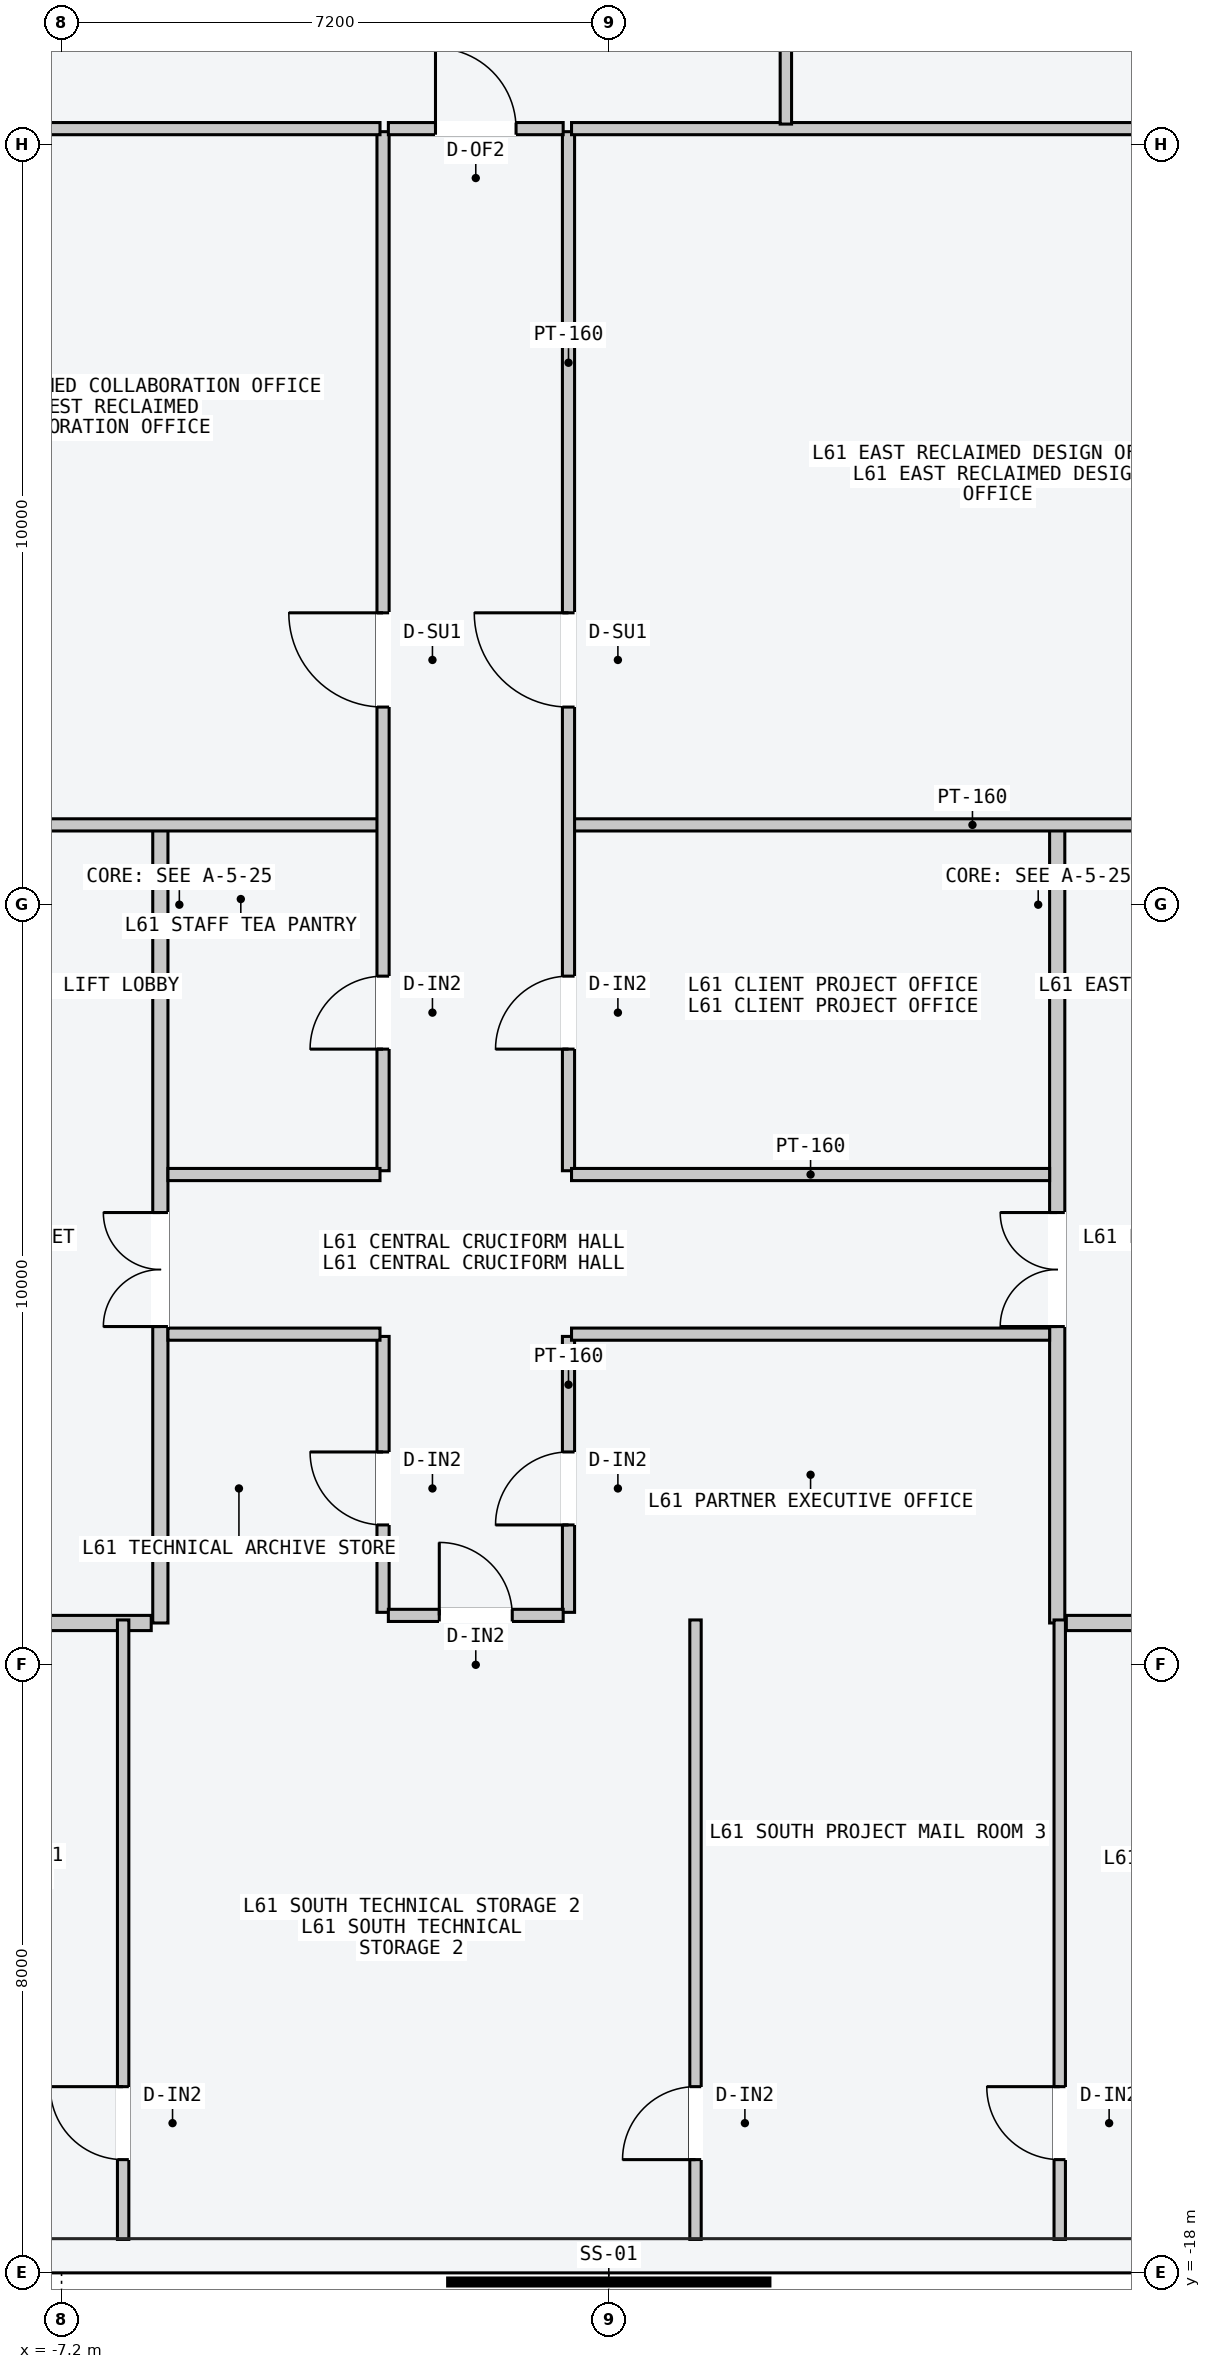
"""IFC4 building model, lengths in metres.
Left out: names, types, materials, properties, quantities, classifications, styles, units other than length and angle.
Written with IfcOpenShell. Run it as: python <this file> out.ifc"""

import sys

from ifc_helpers import new_model, si_unit, direction, frame, frame_2d, origin, place, context, subcontext, project, spatial, rectangle, extrude, element, fill, save


model = new_model("IFC4")
c1 = context("Model", 3, precision=1e-05, world=origin(), true_north=direction((0.0, 1.0)))
c2 = subcontext(c1, "Body", "Model", "MODEL_VIEW")
j1 = project(units=[si_unit("LENGTHUNIT", "METRE"), si_unit("PLANEANGLEUNIT", "RADIAN")], contexts=[c1])
p1 = place(None, origin())
s1 = spatial("IfcSite", under=j1, at=p1, CompositionType="ELEMENT")
p2 = place(p1, origin())
s2 = spatial("IfcBuilding", under=s1, at=p2, CompositionType="ELEMENT")
p3 = place(p2, frame((0.0, 0.0, 232.8)))
s3 = spatial("IfcBuildingStorey", under=s2, at=p3, CompositionType="ELEMENT", Elevation=232.8)
p4 = place(p3, frame((-5.9, -9.45, 0.0), z_axis=(0.0, 0.0, 1.0), x_axis=(0.0, 1.0, 0.0)))
e1 = element("IfcWall", 1, at=p4, inside=s3, PredefinedType="PARTITIONING", context=c2, shape_type="SweptSolid", body=[
    extrude(rectangle(XDim=10.5, YDim=0.2, at=frame_2d((5.25, 0.0))), origin(), (0.0, 0.0, 1.0), 3.4),
])
p5 = place(p4, frame((3.9, 0.0, 0.0)))
e2 = element("IfcOpeningElement", 2, at=p5, cuts=e1, PredefinedType="OPENING", context=c2, shape_type="SweptSolid", body=[
    extrude(rectangle(XDim=1.5, YDim=2.2, at=frame_2d((0.75, 1.1))), frame((0.0, 0.11, 0.0), z_axis=(0.0, -1.0, 0.0), x_axis=(1.0, 0.0, 0.0)), (0.0, 0.0, 1.0), 0.22),
])
p6 = place(p3, frame((-6.02, -9.45, 0.0), z_axis=(0.0, 0.0, 1.0), x_axis=(-1.0, 0.0, 0.0)))
e3 = element("IfcWall", 3, at=p6, inside=s3, PredefinedType="PARTITIONING", context=c2, shape_type="SweptSolid", body=[
    extrude(rectangle(XDim=1.8, YDim=0.2, at=frame_2d((0.9, 0.0))), origin(), (0.0, 0.0, 1.0), 3.4),
])
p7 = place(p3, frame((5.9, -9.45, 0.0), z_axis=(0.0, 0.0, 1.0), x_axis=(0.0, 1.0, 0.0)))
e4 = element("IfcWall", 4, at=p7, inside=s3, PredefinedType="PARTITIONING", context=c2, shape_type="SweptSolid", body=[
    extrude(rectangle(XDim=10.5, YDim=0.2, at=frame_2d((5.25, 0.0))), origin(), (0.0, 0.0, 1.0), 3.4),
])
p8 = place(p7, frame((3.9, 0.0, 0.0)))
e5 = element("IfcOpeningElement", 5, at=p8, cuts=e4, PredefinedType="OPENING", context=c2, shape_type="SweptSolid", body=[
    extrude(rectangle(XDim=1.5, YDim=2.2, at=frame_2d((0.75, 1.1))), frame((0.0, 0.11, 0.0), z_axis=(0.0, -1.0, 0.0), x_axis=(1.0, 0.0, 0.0)), (0.0, 0.0, 1.0), 0.22),
])
p9 = place(p3, frame((6.02, -9.45, 0.0), z_axis=(0.0, 0.0, 1.0), x_axis=(1.0, 0.0, 0.0)))
e6 = element("IfcWall", 6, at=p9, inside=s3, PredefinedType="PARTITIONING", context=c2, shape_type="SweptSolid", body=[
    extrude(rectangle(XDim=1.8, YDim=0.2, at=frame_2d((0.9, 0.0))), origin(), (0.0, 0.0, 1.0), 3.4),
])
p10 = place(p3, frame((-10.05, 1.05, 0.0), z_axis=(0.0, 0.0, 1.0), x_axis=(1.0, 0.0, 0.0)))
e7 = element("IfcWall", 7, at=p10, inside=s3, PredefinedType="PARTITIONING", context=c2, shape_type="SweptSolid", body=[
    extrude(rectangle(XDim=7.04, YDim=0.16, at=frame_2d((3.52, 0.0))), origin(), (0.0, 0.0, 1.0), 3.4),
])
p11 = place(p3, frame((-2.97, -3.5, 0.0), z_axis=(0.0, 0.0, 1.0), x_axis=(0.0, 1.0, 0.0)))
e8 = element("IfcWall", 8, at=p11, inside=s3, PredefinedType="PARTITIONING", context=c2, shape_type="SweptSolid", body=[
    extrude(rectangle(XDim=13.67, YDim=0.16, at=frame_2d((6.835, 0.0))), origin(), (0.0, 0.0, 1.0), 3.4),
])
p12 = place(p11, frame((6.1, 0.0, 0.0)))
e9 = element("IfcOpeningElement", 9, at=p12, cuts=e8, PredefinedType="OPENING", context=c2, shape_type="SweptSolid", body=[
    extrude(rectangle(XDim=1.24, YDim=2.24, at=frame_2d((0.62, 1.12))), frame((0.0, 0.09, 0.0), z_axis=(0.0, -1.0, 0.0), x_axis=(1.0, 0.0, 0.0)), (0.0, 0.0, 1.0), 0.18),
])
p13 = place(p11, frame((1.6, 0.0, 0.0)))
e10 = element("IfcOpeningElement", 10, at=p13, cuts=e8, PredefinedType="OPENING", context=c2, shape_type="SweptSolid", body=[
    extrude(rectangle(XDim=0.96, YDim=2.18, at=frame_2d((0.48, 1.09))), frame((0.0, 0.09, 0.0), z_axis=(0.0, -1.0, 0.0), x_axis=(1.0, 0.0, 0.0)), (0.0, 0.0, 1.0), 0.18),
])
p14 = place(p3, frame((-7.5, 10.21, 0.0), z_axis=(0.0, 0.0, 1.0), x_axis=(1.0, 0.0, 0.0)))
e11 = element("IfcWall", 11, at=p14, inside=s3, PredefinedType="PARTITIONING", context=c2, shape_type="SweptSolid", body=[
    extrude(rectangle(XDim=4.49, YDim=0.16, at=frame_2d((2.245, 0.0))), origin(), (0.0, 0.0, 1.0), 3.4),
])
p15 = place(p3, frame((-5.8, -3.55, 0.0), z_axis=(0.0, 0.0, 1.0), x_axis=(1.0, 0.0, 0.0)))
e12 = element("IfcWall", 12, at=p15, inside=s3, PredefinedType="PARTITIONING", context=c2, shape_type="SweptSolid", body=[
    extrude(rectangle(XDim=2.79, YDim=0.16, at=frame_2d((1.395, 0.0))), origin(), (0.0, 0.0, 1.0), 3.4),
])
p16 = place(p3, frame((-0.49, 1.05, 0.0), z_axis=(0.0, 0.0, 1.0), x_axis=(1.0, 0.0, 0.0)))
e13 = element("IfcWall", 13, at=p16, inside=s3, PredefinedType="PARTITIONING", context=c2, shape_type="SweptSolid", body=[
    extrude(rectangle(XDim=10.55, YDim=0.16, at=frame_2d((5.275, 0.0))), origin(), (0.0, 0.0, 1.0), 3.4),
])
p17 = place(p3, frame((-0.53, -3.5, 0.0), z_axis=(0.0, 0.0, 1.0), x_axis=(0.0, 1.0, 0.0)))
e14 = element("IfcWall", 14, at=p17, inside=s3, PredefinedType="PARTITIONING", context=c2, shape_type="SweptSolid", body=[
    extrude(rectangle(XDim=13.67, YDim=0.16, at=frame_2d((6.835, 0.0))), origin(), (0.0, 0.0, 1.0), 3.4),
])
p18 = place(p17, frame((6.1, 0.0, 0.0)))
e15 = element("IfcOpeningElement", 15, at=p18, cuts=e14, PredefinedType="OPENING", context=c2, shape_type="SweptSolid", body=[
    extrude(rectangle(XDim=1.24, YDim=2.24, at=frame_2d((0.62, 1.12))), frame((0.0, 0.09, 0.0), z_axis=(0.0, -1.0, 0.0), x_axis=(1.0, 0.0, 0.0)), (0.0, 0.0, 1.0), 0.18),
])
p19 = place(p17, frame((1.6, 0.0, 0.0)))
e16 = element("IfcOpeningElement", 16, at=p19, cuts=e14, PredefinedType="OPENING", context=c2, shape_type="SweptSolid", body=[
    extrude(rectangle(XDim=0.96, YDim=2.18, at=frame_2d((0.48, 1.09))), frame((0.0, 0.09, 0.0), z_axis=(0.0, -1.0, 0.0), x_axis=(1.0, 0.0, 0.0)), (0.0, 0.0, 1.0), 0.18),
])
p20 = place(p3, frame((-0.49, 10.21, 0.0), z_axis=(0.0, 0.0, 1.0), x_axis=(1.0, 0.0, 0.0)))
e17 = element("IfcWall", 17, at=p20, inside=s3, PredefinedType="PARTITIONING", context=c2, shape_type="SweptSolid", body=[
    extrude(rectangle(XDim=7.99, YDim=0.16, at=frame_2d((3.995, 0.0))), origin(), (0.0, 0.0, 1.0), 3.4),
])
p21 = place(p3, frame((-0.49, -3.55, 0.0), z_axis=(0.0, 0.0, 1.0), x_axis=(1.0, 0.0, 0.0)))
e18 = element("IfcWall", 18, at=p21, inside=s3, PredefinedType="PARTITIONING", context=c2, shape_type="SweptSolid", body=[
    extrude(rectangle(XDim=6.29, YDim=0.16, at=frame_2d((3.145, 0.0))), origin(), (0.0, 0.0, 1.0), 3.4),
])
p22 = place(p3, frame((-2.97, -9.31, 0.0), z_axis=(0.0, 0.0, 1.0), x_axis=(0.0, 1.0, 0.0)))
e19 = element("IfcWall", 19, at=p22, inside=s3, PredefinedType="PARTITIONING", context=c2, shape_type="SweptSolid", body=[
    extrude(rectangle(XDim=3.63, YDim=0.16, at=frame_2d((1.815, 0.0))), origin(), (0.0, 0.0, 1.0), 3.4),
])
p23 = place(p22, frame((1.15, 0.0, 0.0)))
e20 = element("IfcOpeningElement", 20, at=p23, cuts=e19, PredefinedType="OPENING", context=c2, shape_type="SweptSolid", body=[
    extrude(rectangle(XDim=0.96, YDim=2.18, at=frame_2d((0.48, 1.09))), frame((0.0, 0.09, 0.0), z_axis=(0.0, -1.0, 0.0), x_axis=(1.0, 0.0, 0.0)), (0.0, 0.0, 1.0), 0.18),
])
p24 = place(p3, frame((-0.53, -9.31, 0.0), z_axis=(0.0, 0.0, 1.0), x_axis=(0.0, 1.0, 0.0)))
e21 = element("IfcWall", 21, at=p24, inside=s3, PredefinedType="PARTITIONING", context=c2, shape_type="SweptSolid", body=[
    extrude(rectangle(XDim=3.63, YDim=0.16, at=frame_2d((1.815, 0.0))), origin(), (0.0, 0.0, 1.0), 3.4),
])
p25 = place(p24, frame((1.15, 0.0, 0.0)))
e22 = element("IfcOpeningElement", 22, at=p25, cuts=e21, PredefinedType="OPENING", context=c2, shape_type="SweptSolid", body=[
    extrude(rectangle(XDim=0.96, YDim=2.18, at=frame_2d((0.48, 1.09))), frame((0.0, 0.09, 0.0), z_axis=(0.0, -1.0, 0.0), x_axis=(1.0, 0.0, 0.0)), (0.0, 0.0, 1.0), 0.18),
])
p26 = place(p3, frame((-5.8, -5.65, 0.0), z_axis=(0.0, 0.0, 1.0), x_axis=(1.0, 0.0, 0.0)))
e23 = element("IfcWall", 23, at=p26, inside=s3, PredefinedType="PARTITIONING", context=c2, shape_type="SweptSolid", body=[
    extrude(rectangle(XDim=2.79, YDim=0.16, at=frame_2d((1.395, 0.0))), origin(), (0.0, 0.0, 1.0), 3.4),
])
p27 = place(p3, frame((-0.49, -5.65, 0.0), z_axis=(0.0, 0.0, 1.0), x_axis=(1.0, 0.0, 0.0)))
e24 = element("IfcWall", 24, at=p27, inside=s3, PredefinedType="PARTITIONING", context=c2, shape_type="SweptSolid", body=[
    extrude(rectangle(XDim=6.29, YDim=0.16, at=frame_2d((3.145, 0.0))), origin(), (0.0, 0.0, 1.0), 3.4),
])
p28 = place(p3, frame((2.33, 10.27, 0.0), z_axis=(0.0, 0.0, 1.0), x_axis=(0.0, 1.0, 0.0)))
e25 = element("IfcWall", 25, at=p28, inside=s3, PredefinedType="PARTITIONING", context=c2, shape_type="SweptSolid", body=[
    extrude(rectangle(XDim=6.28, YDim=0.15, at=frame_2d((3.14, 0.0))), origin(), (0.0, 0.0, 1.0), 3.4),
])
p29 = place(p28, frame((1.15, 0.0, 0.0)))
e26 = element("IfcOpeningElement", 26, at=p29, cuts=e25, PredefinedType="OPENING", context=c2, shape_type="SweptSolid", body=[
    extrude(rectangle(XDim=0.96, YDim=2.18, at=frame_2d((0.48, 1.09))), frame((0.0, 0.085, 0.0), z_axis=(0.0, -1.0, 0.0), x_axis=(1.0, 0.0, 0.0)), (0.0, 0.0, 1.0), 0.17),
])
p30 = place(p3, frame((-2.9, 10.21, 0.0), z_axis=(0.0, 0.0, 1.0), x_axis=(1.0, 0.0, 0.0)))
e27 = element("IfcWall", 27, at=p30, inside=s3, PredefinedType="PARTITIONING", context=c2, shape_type="SweptSolid", body=[
    extrude(rectangle(XDim=2.3, YDim=0.16, at=frame_2d((1.15, 0.0))), origin(), (0.0, 0.0, 1.0), 3.4),
])
p31 = place(p30, frame((0.62, 0.0, 0.0)))
e28 = element("IfcOpeningElement", 28, at=p31, cuts=e27, PredefinedType="OPENING", context=c2, shape_type="SweptSolid", body=[
    extrude(rectangle(XDim=1.06, YDim=2.2, at=frame_2d((0.53, 1.1))), frame((0.0, 0.09, 0.0), z_axis=(0.0, -1.0, 0.0), x_axis=(1.0, 0.0, 0.0)), (0.0, 0.0, 1.0), 0.18),
])
p32 = place(p3, frame((-6.39, -17.56, 0.0), z_axis=(0.0, 0.0, 1.0), x_axis=(0.0, 1.0, 0.0)))
e29 = element("IfcWall", 29, at=p32, inside=s3, PredefinedType="PARTITIONING", context=c2, shape_type="SweptSolid", body=[
    extrude(rectangle(XDim=8.15, YDim=0.15, at=frame_2d((4.075, 0.0))), origin(), (0.0, 0.0, 1.0), 3.4),
])
p33 = place(p32, frame((1.05, 0.0, 0.0)))
e30 = element("IfcOpeningElement", 30, at=p33, cuts=e29, PredefinedType="OPENING", context=c2, shape_type="SweptSolid", body=[
    extrude(rectangle(XDim=0.96, YDim=2.18, at=frame_2d((0.48, 1.09))), frame((0.0, 0.085, 0.0), z_axis=(0.0, -1.0, 0.0), x_axis=(1.0, 0.0, 0.0)), (0.0, 0.0, 1.0), 0.17),
])
p34 = place(p3, frame((1.141, -17.56, 0.0), z_axis=(0.0, 0.0, 1.0), x_axis=(0.0, 1.0, 0.0)))
e31 = element("IfcWall", 31, at=p34, inside=s3, PredefinedType="PARTITIONING", context=c2, shape_type="SweptSolid", body=[
    extrude(rectangle(XDim=8.15, YDim=0.15, at=frame_2d((4.075, 0.0))), origin(), (0.0, 0.0, 1.0), 3.4),
])
p35 = place(p34, frame((1.05, 0.0, 0.0)))
e32 = element("IfcOpeningElement", 32, at=p35, cuts=e31, PredefinedType="OPENING", context=c2, shape_type="SweptSolid", body=[
    extrude(rectangle(XDim=0.96, YDim=2.18, at=frame_2d((0.48, 1.09))), frame((0.0, 0.085, 0.0), z_axis=(0.0, -1.0, 0.0), x_axis=(1.0, 0.0, 0.0)), (0.0, 0.0, 1.0), 0.17),
])
p36 = place(p3, frame((5.933, -17.56, 0.0), z_axis=(0.0, 0.0, 1.0), x_axis=(0.0, 1.0, 0.0)))
e33 = element("IfcWall", 33, at=p36, inside=s3, PredefinedType="PARTITIONING", context=c2, shape_type="SweptSolid", body=[
    extrude(rectangle(XDim=8.15, YDim=0.15, at=frame_2d((4.075, 0.0))), origin(), (0.0, 0.0, 1.0), 3.4),
])
p37 = place(p36, frame((1.05, 0.0, 0.0)))
e34 = element("IfcOpeningElement", 34, at=p37, cuts=e33, PredefinedType="OPENING", context=c2, shape_type="SweptSolid", body=[
    extrude(rectangle(XDim=0.96, YDim=2.18, at=frame_2d((0.48, 1.09))), frame((0.0, 0.085, 0.0), z_axis=(0.0, -1.0, 0.0), x_axis=(1.0, 0.0, 0.0)), (0.0, 0.0, 1.0), 0.17),
])
p38 = place(p3, frame((-2.9, -9.35, 0.0), z_axis=(0.0, 0.0, 1.0), x_axis=(1.0, 0.0, 0.0)))
e35 = element("IfcWall", 35, at=p38, inside=s3, PredefinedType="PARTITIONING", context=c2, shape_type="SweptSolid", body=[
    extrude(rectangle(XDim=2.3, YDim=0.16, at=frame_2d((1.15, 0.0))), origin(), (0.0, 0.0, 1.0), 3.4),
])
p39 = place(p38, frame((0.67, 0.0, 0.0)))
e36 = element("IfcOpeningElement", 36, at=p39, cuts=e35, PredefinedType="OPENING", context=c2, shape_type="SweptSolid", body=[
    extrude(rectangle(XDim=0.96, YDim=2.18, at=frame_2d((0.48, 1.09))), frame((0.0, 0.09, 0.0), z_axis=(0.0, -1.0, 0.0), x_axis=(1.0, 0.0, 0.0)), (0.0, 0.0, 1.0), 0.18),
])
p40 = place(p5, origin())
e37 = element("IfcDoor", 37, at=p40, inside=s3, OperationType="DOUBLE_DOOR_SINGLE_SWING", PredefinedType="DOOR", context=c2, shape_type="SweptSolid", body=[
    extrude(rectangle(XDim=1.5, YDim=2.2, at=frame_2d((0.75, 1.1))), frame((0.0, 0.025, 0.0), z_axis=(0.0, -1.0, 0.0), x_axis=(1.0, 0.0, 0.0)), (0.0, 0.0, 1.0), 0.05),
])
fill(e2, e37)
p41 = place(p8, origin())
e38 = element("IfcDoor", 38, at=p41, inside=s3, OperationType="DOUBLE_DOOR_SINGLE_SWING", PredefinedType="DOOR", context=c2, shape_type="SweptSolid", body=[
    extrude(rectangle(XDim=1.5, YDim=2.2, at=frame_2d((0.75, 1.1))), frame((0.0, 0.025, 0.0), z_axis=(0.0, -1.0, 0.0), x_axis=(1.0, 0.0, 0.0)), (0.0, 0.0, 1.0), 0.05),
])
fill(e5, e38)
p42 = place(p12, origin())
e39 = element("IfcDoor", 39, at=p42, inside=s3, OperationType="SINGLE_SWING_RIGHT", PredefinedType="DOOR", context=c2, shape_type="SweptSolid", body=[
    extrude(rectangle(XDim=1.24, YDim=2.24, at=frame_2d((0.62, 1.12))), frame((0.0, 0.025, 0.0), z_axis=(0.0, -1.0, 0.0), x_axis=(1.0, 0.0, 0.0)), (0.0, 0.0, 1.0), 0.05),
])
fill(e9, e39)
p43 = place(p13, origin())
e40 = element("IfcDoor", 40, at=p43, inside=s3, OperationType="SINGLE_SWING_LEFT", PredefinedType="DOOR", context=c2, shape_type="SweptSolid", body=[
    extrude(rectangle(XDim=0.96, YDim=2.18, at=frame_2d((0.48, 1.09))), frame((0.0, 0.025, 0.0), z_axis=(0.0, -1.0, 0.0), x_axis=(1.0, 0.0, 0.0)), (0.0, 0.0, 1.0), 0.05),
])
fill(e10, e40)
p44 = place(p18, origin())
e41 = element("IfcDoor", 41, at=p44, inside=s3, OperationType="SINGLE_SWING_RIGHT", PredefinedType="DOOR", context=c2, shape_type="SweptSolid", body=[
    extrude(rectangle(XDim=1.24, YDim=2.24, at=frame_2d((0.62, 1.12))), frame((0.0, 0.025, 0.0), z_axis=(0.0, -1.0, 0.0), x_axis=(1.0, 0.0, 0.0)), (0.0, 0.0, 1.0), 0.05),
])
fill(e15, e41)
p45 = place(p19, origin())
e42 = element("IfcDoor", 42, at=p45, inside=s3, OperationType="SINGLE_SWING_LEFT", PredefinedType="DOOR", context=c2, shape_type="SweptSolid", body=[
    extrude(rectangle(XDim=0.96, YDim=2.18, at=frame_2d((0.48, 1.09))), frame((0.0, 0.025, 0.0), z_axis=(0.0, -1.0, 0.0), x_axis=(1.0, 0.0, 0.0)), (0.0, 0.0, 1.0), 0.05),
])
fill(e16, e42)
p46 = place(p23, origin())
e43 = element("IfcDoor", 43, at=p46, inside=s3, OperationType="SINGLE_SWING_RIGHT", PredefinedType="DOOR", context=c2, shape_type="SweptSolid", body=[
    extrude(rectangle(XDim=0.96, YDim=2.18, at=frame_2d((0.48, 1.09))), frame((0.0, 0.025, 0.0), z_axis=(0.0, -1.0, 0.0), x_axis=(1.0, 0.0, 0.0)), (0.0, 0.0, 1.0), 0.05),
])
fill(e20, e43)
p47 = place(p25, origin())
e44 = element("IfcDoor", 44, at=p47, inside=s3, OperationType="SINGLE_SWING_LEFT", PredefinedType="DOOR", context=c2, shape_type="SweptSolid", body=[
    extrude(rectangle(XDim=0.96, YDim=2.18, at=frame_2d((0.48, 1.09))), frame((0.0, 0.025, 0.0), z_axis=(0.0, -1.0, 0.0), x_axis=(1.0, 0.0, 0.0)), (0.0, 0.0, 1.0), 0.05),
])
fill(e22, e44)
p48 = place(p31, origin())
e45 = element("IfcDoor", 45, at=p48, inside=s3, OperationType="SINGLE_SWING_LEFT", PredefinedType="DOOR", context=c2, shape_type="SweptSolid", body=[
    extrude(rectangle(XDim=1.06, YDim=2.2, at=frame_2d((0.53, 1.1))), frame((0.0, 0.025, 0.0), z_axis=(0.0, -1.0, 0.0), x_axis=(1.0, 0.0, 0.0)), (0.0, 0.0, 1.0), 0.05),
])
fill(e28, e45)
p49 = place(p33, origin())
e46 = element("IfcDoor", 46, at=p49, inside=s3, OperationType="SINGLE_SWING_RIGHT", PredefinedType="DOOR", context=c2, shape_type="SweptSolid", body=[
    extrude(rectangle(XDim=0.96, YDim=2.18, at=frame_2d((0.48, 1.09))), frame((0.0, 0.025, 0.0), z_axis=(0.0, -1.0, 0.0), x_axis=(1.0, 0.0, 0.0)), (0.0, 0.0, 1.0), 0.05),
])
fill(e30, e46)
p50 = place(p35, origin())
e47 = element("IfcDoor", 47, at=p50, inside=s3, OperationType="SINGLE_SWING_LEFT", PredefinedType="DOOR", context=c2, shape_type="SweptSolid", body=[
    extrude(rectangle(XDim=0.96, YDim=2.18, at=frame_2d((0.48, 1.09))), frame((0.0, 0.025, 0.0), z_axis=(0.0, -1.0, 0.0), x_axis=(1.0, 0.0, 0.0)), (0.0, 0.0, 1.0), 0.05),
])
fill(e32, e47)
p51 = place(p37, origin())
e48 = element("IfcDoor", 48, at=p51, inside=s3, OperationType="SINGLE_SWING_RIGHT", PredefinedType="DOOR", context=c2, shape_type="SweptSolid", body=[
    extrude(rectangle(XDim=0.96, YDim=2.18, at=frame_2d((0.48, 1.09))), frame((0.0, 0.025, 0.0), z_axis=(0.0, -1.0, 0.0), x_axis=(1.0, 0.0, 0.0)), (0.0, 0.0, 1.0), 0.05),
])
fill(e34, e48)
p52 = place(p39, origin())
e49 = element("IfcDoor", 49, at=p52, inside=s3, OperationType="SINGLE_SWING_LEFT", PredefinedType="DOOR", context=c2, shape_type="SweptSolid", body=[
    extrude(rectangle(XDim=0.96, YDim=2.18, at=frame_2d((0.48, 1.09))), frame((0.0, 0.025, 0.0), z_axis=(0.0, -1.0, 0.0), x_axis=(1.0, 0.0, 0.0)), (0.0, 0.0, 1.0), 0.05),
])
fill(e36, e49)
save(model, sys.argv[1])
